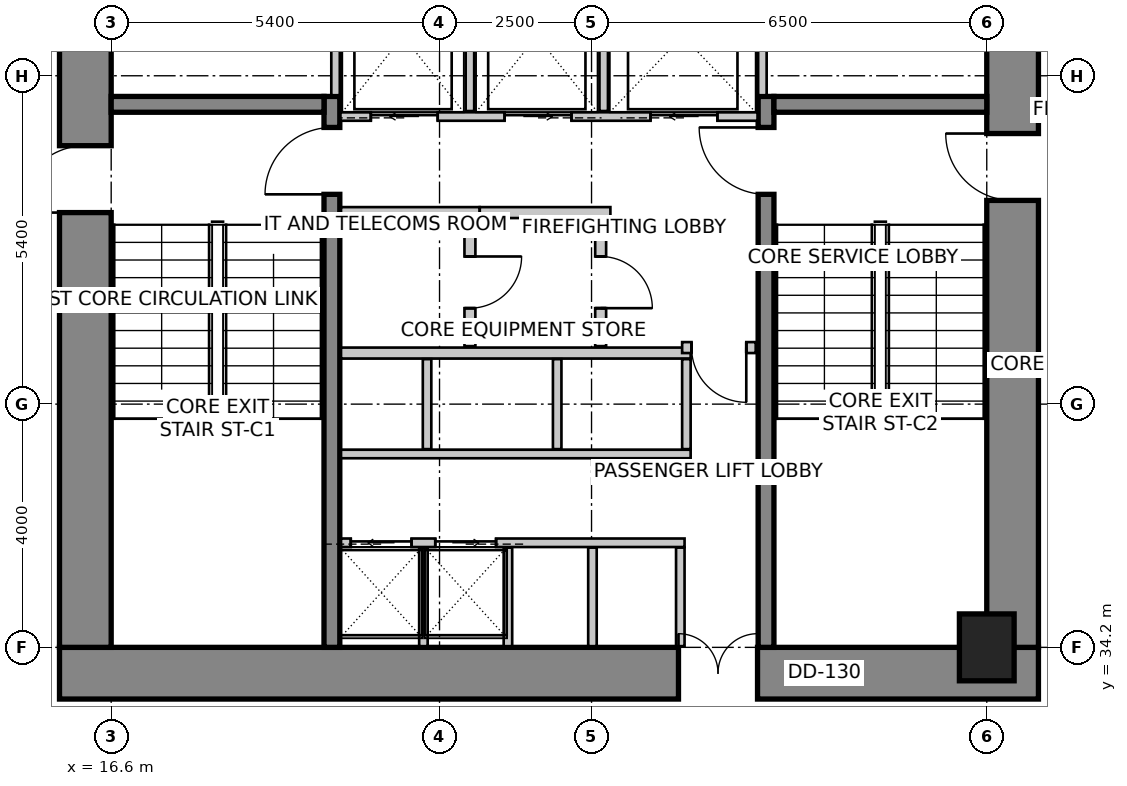
"""IFC4 building model, lengths in metres.
Left out: names, types, materials, properties, quantities, classifications, styles, units other than length and angle.
Written with IfcOpenShell. Run it as: python <this file> out.ifc"""

import sys

from ifc_helpers import new_model, si_unit, direction, frame, frame_2d, origin, origin_2d, place, context, subcontext, project, spatial, rectangle, extrude, source, transform, mapped, element, fill, save


model = new_model("IFC4")
c1 = context("Model", 3, precision=1e-05, world=origin(), true_north=direction((0.0, 1.0)))
c2 = subcontext(c1, "Body", "Model", "MODEL_VIEW")
j1 = project(units=[si_unit("LENGTHUNIT", "METRE"), si_unit("PLANEANGLEUNIT", "RADIAN")], contexts=[c1])
p1 = place(None, origin())
s1 = spatial("IfcSite", under=j1, at=p1, CompositionType="ELEMENT")
p2 = place(p1, origin())
s2 = spatial("IfcBuilding", under=s1, at=p2, CompositionType="ELEMENT")
p3 = place(p2, frame((0.0, 0.0, 35.0)))
s3 = spatial("IfcBuildingStorey", under=s2, at=p3, CompositionType="ELEMENT", Elevation=35.0)
p4 = place(p3, frame((15.75, 33.775, 0.0), z_axis=(0.0, 0.0, 1.0), x_axis=(1.0, 0.0, 0.0)))
e1 = element("IfcWall", 1, at=p4, inside=s3, PredefinedType="SHEAR", context=c2, shape_type="SweptSolid", body=[
    extrude(rectangle(XDim=16.1, YDim=0.85, at=frame_2d((8.05, 0.0))), origin(), (0.0, 0.0, 1.0), 4.0),
])
m1 = source(origin(), c2, "Body", "SweptSolid", [
    extrude(rectangle(XDim=1.3, YDim=2.15, at=frame_2d((0.65, 1.075))), frame((0.0, 0.435, 0.0), z_axis=(0.0, -1.0, 0.0), x_axis=(1.0, 0.0, 0.0)), (0.0, 0.0, 1.0), 0.87),
])
p5 = place(p4, frame((10.18, 0.0, 0.0)))
e2 = element("IfcOpeningElement", 2, at=p5, cuts=e1, PredefinedType="OPENING", context=c2, shape_type="MappedRepresentation", body=[
    mapped(m1, transform((0.0, 0.0, 0.0), scale=1.0)),
])
p6 = place(p3, frame((16.175, 34.2, 0.0), z_axis=(0.0, 0.0, 1.0), x_axis=(0.0, 1.0, 0.0)))
e3 = element("IfcWall", 3, at=p6, inside=s3, PredefinedType="SHEAR", context=c2, shape_type="SweptSolid", body=[
    extrude(rectangle(XDim=11.4, YDim=0.85, at=frame_2d((5.7, 0.0))), origin(), (0.0, 0.0, 1.0), 4.0),
])
m2 = source(origin(), c2, "Body", "SweptSolid", [
    extrude(rectangle(XDim=1.1, YDim=2.15, at=frame_2d((0.55, 1.075))), frame((0.0, 0.435, 0.0), z_axis=(0.0, -1.0, 0.0), x_axis=(1.0, 0.0, 0.0)), (0.0, 0.0, 1.0), 0.87),
])
p7 = place(p6, frame((7.15, 0.0, 0.0)))
e4 = element("IfcOpeningElement", 4, at=p7, cuts=e3, PredefinedType="OPENING", context=c2, shape_type="MappedRepresentation", body=[
    mapped(m2, transform((0.0, 0.0, 0.0), scale=1.0)),
])
p8 = place(p3, frame((31.425, 34.2, 0.0), z_axis=(0.0, 0.0, 1.0), x_axis=(0.0, 1.0, 0.0)))
e5 = element("IfcWall", 5, at=p8, inside=s3, PredefinedType="SHEAR", context=c2, shape_type="SweptSolid", body=[
    extrude(rectangle(XDim=11.4, YDim=0.85, at=frame_2d((5.7, 0.0))), origin(), (0.0, 0.0, 1.0), 4.0),
])
p9 = place(p8, frame((7.35, 0.0, 0.0)))
e6 = element("IfcOpeningElement", 6, at=p9, cuts=e5, PredefinedType="OPENING", context=c2, shape_type="MappedRepresentation", body=[
    mapped(m2, transform((0.0, 0.0, 0.0), scale=1.0)),
])
p10 = place(p3, frame((20.23, 34.2, 0.0), z_axis=(0.0, 0.0, 1.0), x_axis=(0.0, 1.0, 0.0)))
e7 = element("IfcWall", 7, at=p10, inside=s3, PredefinedType="SHEAR", context=c2, shape_type="SweptSolid", body=[
    extrude(rectangle(XDim=9.06, YDim=0.26, at=frame_2d((4.53, 0.0))), origin(), (0.0, 0.0, 1.0), 4.0),
])
m3 = source(origin(), c2, "Body", "SweptSolid", [
    extrude(rectangle(XDim=1.1, YDim=2.15, at=frame_2d((0.55, 1.075))), frame((0.0, 0.14, 0.0), z_axis=(0.0, -1.0, 0.0), x_axis=(1.0, 0.0, 0.0)), (0.0, 0.0, 1.0), 0.28),
])
p11 = place(p10, frame((7.45, 0.0, 0.0)))
e8 = element("IfcOpeningElement", 8, at=p11, cuts=e7, PredefinedType="OPENING", context=c2, shape_type="MappedRepresentation", body=[
    mapped(m3, transform((0.0, 0.0, 0.0), scale=1.0)),
])
p12 = place(p3, frame((27.37, 34.2, 0.0), z_axis=(0.0, 0.0, 1.0), x_axis=(0.0, 1.0, 0.0)))
e9 = element("IfcWall", 9, at=p12, inside=s3, PredefinedType="SHEAR", context=c2, shape_type="SweptSolid", body=[
    extrude(rectangle(XDim=9.06, YDim=0.26, at=frame_2d((4.53, 0.0))), origin(), (0.0, 0.0, 1.0), 4.0),
])
p13 = place(p12, frame((7.45, 0.0, 0.0)))
e10 = element("IfcOpeningElement", 10, at=p13, cuts=e9, PredefinedType="OPENING", context=c2, shape_type="MappedRepresentation", body=[
    mapped(m3, transform((0.0, 0.0, 0.0), scale=1.0)),
])
for number, where, z_axis, x_axis in (
    (11, (16.6, 43.13, 0.0), (0.0, 0.0, 1.0), (1.0, 0.0, 0.0)),
    (12, (27.5, 43.13, 0.0), (0.0, 0.0, 1.0), (1.0, 0.0, 0.0)),
):
    element("IfcWall", number, at=place(p3, frame(where, z_axis=z_axis, x_axis=x_axis)), inside=s3, PredefinedType="SHEAR", context=c2, shape_type="SweptSolid", body=[
        extrude(rectangle(XDim=3.5, YDim=0.26, at=frame_2d((1.75, 0.0))), origin(), (0.0, 0.0, 1.0), 4.0),
    ])
m4 = source(origin(), c2, "Body", "SweptSolid", [
    extrude(rectangle(XDim=0.9, YDim=1.1, at=origin_2d()), origin(), (0.0, 0.0, 1.0), 4.0),
])
p14 = place(p3, frame((31.0, 34.2, 0.0), z_axis=(0.0, 0.0, 1.0), x_axis=(1.0, 0.0, 0.0)))
e13 = element("IfcColumn", 13, at=p14, inside=s3, PredefinedType="COLUMN", context=c2, shape_type="MappedRepresentation", body=[
    mapped(m4, transform((0.0, 0.0, 0.0), scale=1.0)),
])
p15 = place(p3, frame((20.37, 42.93, 0.0), z_axis=(0.0, 0.0, 1.0), x_axis=(1.0, 0.0, 0.0)))
e14 = element("IfcWall", 14, at=p15, inside=s3, PredefinedType="SOLIDWALL", context=c2, shape_type="SweptSolid", body=[
    extrude(rectangle(XDim=6.86, YDim=0.14, at=frame_2d((3.43, 0.0))), origin(), (0.0, 0.0, 1.0), 3.75),
])
m5 = source(origin(), c2, "Body", "SweptSolid", [
    extrude(rectangle(XDim=1.1, YDim=2.15, at=frame_2d((0.55, 1.075))), frame((0.0, 0.08, 0.0), z_axis=(0.0, -1.0, 0.0), x_axis=(1.0, 0.0, 0.0)), (0.0, 0.0, 1.0), 0.16),
])
p16 = place(p15, frame((0.5, 0.0, 0.0)))
e15 = element("IfcOpeningElement", 15, at=p16, cuts=e14, PredefinedType="OPENING", context=c2, shape_type="MappedRepresentation", body=[
    mapped(m5, transform((0.0, 0.0, 0.0), scale=1.0)),
])
p17 = place(p15, frame((2.7, 0.0, 0.0)))
e16 = element("IfcOpeningElement", 16, at=p17, cuts=e14, PredefinedType="OPENING", context=c2, shape_type="MappedRepresentation", body=[
    mapped(m5, transform((0.0, 0.0, 0.0), scale=1.0)),
])
p18 = place(p15, frame((5.1, 0.0, 0.0)))
e17 = element("IfcOpeningElement", 17, at=p18, cuts=e14, PredefinedType="OPENING", context=c2, shape_type="MappedRepresentation", body=[
    mapped(m5, transform((0.0, 0.0, 0.0), scale=1.0)),
])
for number, where, z_axis, x_axis in (
    (18, (20.29, 43.28, 0.0), (0.0, 0.0, 1.0), (0.0, 1.0, 0.0)),
    (19, (27.31, 43.28, 0.0), (0.0, 0.0, 1.0), (0.0, 1.0, 0.0)),
):
    element("IfcWall", number, at=place(p3, frame(where, z_axis=z_axis, x_axis=x_axis)), inside=s3, PredefinedType="SOLIDWALL", context=c2, shape_type="SweptSolid", body=[
        extrude(rectangle(XDim=2.3, YDim=0.14, at=frame_2d((1.15, 0.0))), origin(), (0.0, 0.0, 1.0), 3.75),
    ])
for number, where, z_axis, x_axis in (
    (20, (22.5, 43.02, 0.0), (0.0, 0.0, 1.0), (0.0, 1.0, 0.0)),
    (21, (24.7, 43.02, 0.0), (0.0, 0.0, 1.0), (0.0, 1.0, 0.0)),
):
    element("IfcWall", number, at=place(p3, frame(where, z_axis=z_axis, x_axis=x_axis)), inside=s3, PredefinedType="SOLIDWALL", context=c2, shape_type="SweptSolid", body=[
        extrude(rectangle(XDim=2.56, YDim=0.14, at=frame_2d((1.28, 0.0))), origin(), (0.0, 0.0, 1.0), 3.75),
    ])
p19 = place(p3, frame((20.38, 35.92, 0.0), z_axis=(0.0, 0.0, 1.0), x_axis=(1.0, 0.0, 0.0)))
e22 = element("IfcWall", 22, at=p19, inside=s3, PredefinedType="SOLIDWALL", context=c2, shape_type="SweptSolid", body=[
    extrude(rectangle(XDim=5.65, YDim=0.14, at=frame_2d((2.825, 0.0))), origin(), (0.0, 0.0, 1.0), 3.75),
])
m6 = source(origin(), c2, "Body", "SweptSolid", [
    extrude(rectangle(XDim=1.0, YDim=2.15, at=frame_2d((0.5, 1.075))), frame((0.0, 0.08, 0.0), z_axis=(0.0, -1.0, 0.0), x_axis=(1.0, 0.0, 0.0)), (0.0, 0.0, 1.0), 0.16),
])
p20 = place(p19, frame((0.16, 0.0, 0.0)))
e23 = element("IfcOpeningElement", 23, at=p20, cuts=e22, PredefinedType="OPENING", context=c2, shape_type="MappedRepresentation", body=[
    mapped(m6, transform((0.0, 0.0, 0.0), scale=1.0)),
])
p21 = place(p19, frame((1.55, 0.0, 0.0)))
e24 = element("IfcOpeningElement", 24, at=p21, cuts=e22, PredefinedType="OPENING", context=c2, shape_type="MappedRepresentation", body=[
    mapped(m6, transform((0.0, 0.0, 0.0), scale=1.0)),
])
for number, where, z_axis, x_axis in (
    (25, (25.96, 34.22, 0.0), (0.0, 0.0, 1.0), (0.0, 1.0, 0.0)),
    (26, (21.735, 34.22, 0.0), (0.0, 0.0, 1.0), (0.0, 1.0, 0.0)),
    (27, (23.125, 34.22, 0.0), (0.0, 0.0, 1.0), (0.0, 1.0, 0.0)),
    (28, (24.515, 34.22, 0.0), (0.0, 0.0, 1.0), (0.0, 1.0, 0.0)),
):
    element("IfcWall", number, at=place(p3, frame(where, z_axis=z_axis, x_axis=x_axis)), inside=s3, PredefinedType="SOLIDWALL", context=c2, shape_type="SweptSolid", body=[
        extrude(rectangle(XDim=1.62, YDim=0.14, at=frame_2d((0.81, 0.0))), origin(), (0.0, 0.0, 1.0), 3.042),
    ])
p22 = place(p3, frame((20.38, 37.38, 0.0), z_axis=(0.0, 0.0, 1.0), x_axis=(1.0, 0.0, 0.0)))
e29 = element("IfcWall", 29, at=p22, inside=s3, PredefinedType="SOLIDWALL", context=c2, shape_type="SweptSolid", body=[
    extrude(rectangle(XDim=5.75, YDim=0.14, at=frame_2d((2.875, 0.0))), origin(), (0.0, 0.0, 1.0), 3.75),
])
p23 = place(p3, frame((20.38, 39.04, 0.0), z_axis=(0.0, 0.0, 1.0), x_axis=(1.0, 0.0, 0.0)))
e30 = element("IfcWall", 30, at=p23, inside=s3, PredefinedType="SOLIDWALL", context=c2, shape_type="SweptSolid", body=[
    extrude(rectangle(XDim=5.75, YDim=0.18, at=frame_2d((2.875, 0.0))), origin(), (0.0, 0.0, 1.0), 3.75),
])
for number, where, z_axis, x_axis in (
    (31, (26.06, 37.46, 0.0), (0.0, 0.0, 1.0), (0.0, 1.0, 0.0)),
    (32, (21.795, 37.46, 0.0), (0.0, 0.0, 1.0), (0.0, 1.0, 0.0)),
    (33, (23.935, 37.46, 0.0), (0.0, 0.0, 1.0), (0.0, 1.0, 0.0)),
):
    element("IfcWall", number, at=place(p3, frame(where, z_axis=z_axis, x_axis=x_axis)), inside=s3, PredefinedType="SOLIDWALL", context=c2, shape_type="SweptSolid", body=[
        extrude(rectangle(XDim=1.48, YDim=0.14, at=frame_2d((0.74, 0.0))), origin(), (0.0, 0.0, 1.0), 3.75),
    ])
p24 = place(p3, frame((22.66, 41.35, 0.0), z_axis=(0.0, 0.0, 1.0), x_axis=(-1.0, 0.0, 0.0)))
e34 = element("IfcWall", 34, at=p24, inside=s3, PredefinedType="PARTITIONING", context=c2, shape_type="SweptSolid", body=[
    extrude(rectangle(XDim=2.28, YDim=0.18, at=frame_2d((1.14, 0.0))), origin(), (0.0, 0.0, 1.0), 3.75),
])
p25 = place(p3, frame((24.81, 41.35, 0.0), z_axis=(0.0, 0.0, 1.0), x_axis=(-1.0, 0.0, 0.0)))
e35 = element("IfcWall", 35, at=p25, inside=s3, PredefinedType="PARTITIONING", context=c2, shape_type="SweptSolid", body=[
    extrude(rectangle(XDim=2.148, YDim=0.18, at=frame_2d((1.074, 0.0))), origin(), (0.0, 0.0, 1.0), 3.75),
])
p26 = place(p3, frame((22.5, 41.256, 0.0), z_axis=(0.0, 0.0, 1.0), x_axis=(0.0, -1.0, 0.0)))
e36 = element("IfcWall", 36, at=p26, inside=s3, PredefinedType="PARTITIONING", context=c2, shape_type="SweptSolid", body=[
    extrude(rectangle(XDim=2.106, YDim=0.18, at=frame_2d((1.053, 0.0))), origin(), (0.0, 0.0, 1.0), 3.75),
])
m7 = source(origin(), c2, "Body", "SweptSolid", [
    extrude(rectangle(XDim=0.85, YDim=2.15, at=frame_2d((0.425, 1.075))), frame((0.0, 0.1, 0.0), z_axis=(0.0, -1.0, 0.0), x_axis=(1.0, 0.0, 0.0)), (0.0, 0.0, 1.0), 0.2),
])
p27 = place(p26, frame((0.628, 0.0, 0.0)))
e37 = element("IfcOpeningElement", 37, at=p27, cuts=e36, PredefinedType="OPENING", context=c2, shape_type="MappedRepresentation", body=[
    mapped(m7, transform((0.0, 0.0, 0.0), scale=1.0)),
])
p28 = place(p3, frame((24.65, 41.256, 0.0), z_axis=(0.0, 0.0, 1.0), x_axis=(0.0, -1.0, 0.0)))
e38 = element("IfcWall", 38, at=p28, inside=s3, PredefinedType="PARTITIONING", context=c2, shape_type="SweptSolid", body=[
    extrude(rectangle(XDim=2.106, YDim=0.18, at=frame_2d((1.053, 0.0))), origin(), (0.0, 0.0, 1.0), 3.75),
])
p29 = place(p28, frame((0.628, 0.0, 0.0)))
e39 = element("IfcOpeningElement", 39, at=p29, cuts=e38, PredefinedType="OPENING", context=c2, shape_type="MappedRepresentation", body=[
    mapped(m7, transform((0.0, 0.0, 0.0), scale=1.0)),
])
p30 = place(p3, frame((27.2, 39.13, 0.0), z_axis=(0.0, 0.0, 1.0), x_axis=(-1.0, 0.0, 0.0)))
e40 = element("IfcWall", 40, at=p30, inside=s3, PredefinedType="PARTITIONING", context=c2, shape_type="SweptSolid", body=[
    extrude(rectangle(XDim=1.21, YDim=0.18, at=frame_2d((0.605, 0.0))), origin(), (0.0, 0.0, 1.0), 3.75),
])
m8 = source(origin(), c2, "Body", "SweptSolid", [
    extrude(rectangle(XDim=0.9, YDim=2.15, at=frame_2d((0.45, 1.075))), frame((0.0, 0.1, 0.0), z_axis=(0.0, -1.0, 0.0), x_axis=(1.0, 0.0, 0.0)), (0.0, 0.0, 1.0), 0.2),
])
p31 = place(p30, frame((0.155, 0.0, 0.0)))
e41 = element("IfcOpeningElement", 41, at=p31, cuts=e40, PredefinedType="OPENING", context=c2, shape_type="MappedRepresentation", body=[
    mapped(m8, transform((0.0, 0.0, 0.0), scale=1.0)),
])
m9 = source(origin(), c2, "Body", "SweptSolid", [
    extrude(rectangle(XDim=1.1, YDim=2.15, at=frame_2d((0.55, 1.075))), frame((0.0, 0.025, 0.0), z_axis=(0.0, -1.0, 0.0), x_axis=(1.0, 0.0, 0.0)), (0.0, 0.0, 1.0), 0.05),
])
p32 = place(p16, origin())
e42 = element("IfcDoor", 42, at=p32, inside=s3, OperationType="SLIDING_TO_LEFT", PredefinedType="DOOR", context=c2, shape_type="MappedRepresentation", body=[
    mapped(m9, transform((0.0, 0.0, 0.0), scale=1.0)),
])
fill(e15, e42)
p33 = place(p17, origin())
e43 = element("IfcDoor", 43, at=p33, inside=s3, OperationType="SLIDING_TO_RIGHT", PredefinedType="DOOR", context=c2, shape_type="MappedRepresentation", body=[
    mapped(m9, transform((0.0, 0.0, 0.0), scale=1.0)),
])
fill(e16, e43)
m10 = source(origin(), c2, "Body", "SweptSolid", [
    extrude(rectangle(XDim=1.1, YDim=2.15, at=frame_2d((0.55, 1.075))), frame((0.0, 0.025, 0.0), z_axis=(0.0, -1.0, 0.0), x_axis=(1.0, 0.0, 0.0)), (0.0, 0.0, 1.0), 0.05),
])
p34 = place(p18, origin())
e44 = element("IfcDoor", 44, at=p34, inside=s3, OperationType="SLIDING_TO_LEFT", PredefinedType="DOOR", context=c2, shape_type="MappedRepresentation", body=[
    mapped(m10, transform((0.0, 0.0, 0.0), scale=1.0)),
])
fill(e17, e44)
m11 = source(origin(), c2, "Body", "SweptSolid", [
    extrude(rectangle(XDim=1.0, YDim=2.15, at=frame_2d((0.5, 1.075))), frame((0.0, 0.025, 0.0), z_axis=(0.0, -1.0, 0.0), x_axis=(1.0, 0.0, 0.0)), (0.0, 0.0, 1.0), 0.05),
])
p35 = place(p20, origin())
e45 = element("IfcDoor", 45, at=p35, inside=s3, OperationType="SLIDING_TO_LEFT", PredefinedType="DOOR", context=c2, shape_type="MappedRepresentation", body=[
    mapped(m11, transform((0.0, 0.0, 0.0), scale=1.0)),
])
fill(e23, e45)
p36 = place(p21, origin())
e46 = element("IfcDoor", 46, at=p36, inside=s3, OperationType="SLIDING_TO_RIGHT", PredefinedType="DOOR", context=c2, shape_type="MappedRepresentation", body=[
    mapped(m11, transform((0.0, 0.0, 0.0), scale=1.0)),
])
fill(e24, e46)
m12 = source(origin(), c2, "Body", "SweptSolid", [
    extrude(rectangle(XDim=1.1, YDim=2.15, at=frame_2d((0.55, 1.075))), frame((0.0, 0.025, 0.0), z_axis=(0.0, -1.0, 0.0), x_axis=(1.0, 0.0, 0.0)), (0.0, 0.0, 1.0), 0.05),
])
p37 = place(p11, origin())
e47 = element("IfcDoor", 47, at=p37, inside=s3, OperationType="SINGLE_SWING_LEFT", PredefinedType="DOOR", context=c2, shape_type="MappedRepresentation", body=[
    mapped(m12, transform((0.0, 0.0, 0.0), scale=1.0)),
])
fill(e8, e47)
p38 = place(p13, origin())
e48 = element("IfcDoor", 48, at=p38, inside=s3, OperationType="SINGLE_SWING_RIGHT", PredefinedType="DOOR", context=c2, shape_type="MappedRepresentation", body=[
    mapped(m12, transform((0.0, 0.0, 0.0), scale=1.0)),
])
fill(e10, e48)
p39 = place(p7, origin())
e49 = element("IfcDoor", 49, at=p39, inside=s3, OperationType="SINGLE_SWING_LEFT", PredefinedType="DOOR", context=c2, shape_type="MappedRepresentation", body=[
    mapped(m12, transform((0.0, 0.0, 0.0), scale=1.0)),
])
fill(e4, e49)
p40 = place(p9, origin())
e50 = element("IfcDoor", 50, at=p40, inside=s3, OperationType="SINGLE_SWING_RIGHT", PredefinedType="DOOR", context=c2, shape_type="MappedRepresentation", body=[
    mapped(m12, transform((0.0, 0.0, 0.0), scale=1.0)),
])
fill(e6, e50)
m13 = source(origin(), c2, "Body", "SweptSolid", [
    extrude(rectangle(XDim=1.3, YDim=2.15, at=frame_2d((0.65, 1.075))), frame((0.0, 0.025, 0.0), z_axis=(0.0, -1.0, 0.0), x_axis=(1.0, 0.0, 0.0)), (0.0, 0.0, 1.0), 0.05),
])
p41 = place(p5, origin())
e51 = element("IfcDoor", 51, at=p41, inside=s3, OperationType="DOUBLE_DOOR_SINGLE_SWING", PredefinedType="DOOR", context=c2, shape_type="MappedRepresentation", body=[
    mapped(m13, transform((0.0, 0.0, 0.0), scale=1.0)),
])
fill(e2, e51)
m14 = source(origin(), c2, "Body", "SweptSolid", [
    extrude(rectangle(XDim=0.85, YDim=2.15, at=frame_2d((0.425, 1.075))), frame((0.0, 0.025, 0.0), z_axis=(0.0, -1.0, 0.0), x_axis=(1.0, 0.0, 0.0)), (0.0, 0.0, 1.0), 0.05),
])
p42 = place(p27, origin())
e52 = element("IfcDoor", 52, at=p42, inside=s3, OperationType="SINGLE_SWING_LEFT", PredefinedType="DOOR", context=c2, shape_type="MappedRepresentation", body=[
    mapped(m14, transform((0.0, 0.0, 0.0), scale=1.0)),
])
fill(e37, e52)
p43 = place(p29, origin())
e53 = element("IfcDoor", 53, at=p43, inside=s3, OperationType="SINGLE_SWING_RIGHT", PredefinedType="DOOR", context=c2, shape_type="MappedRepresentation", body=[
    mapped(m14, transform((0.0, 0.0, 0.0), scale=1.0)),
])
fill(e39, e53)
m15 = source(origin(), c2, "Body", "SweptSolid", [
    extrude(rectangle(XDim=0.9, YDim=2.15, at=frame_2d((0.45, 1.075))), frame((0.0, 0.025, 0.0), z_axis=(0.0, -1.0, 0.0), x_axis=(1.0, 0.0, 0.0)), (0.0, 0.0, 1.0), 0.05),
])
p44 = place(p31, origin())
e54 = element("IfcDoor", 54, at=p44, inside=s3, OperationType="SINGLE_SWING_LEFT", PredefinedType="DOOR", context=c2, shape_type="MappedRepresentation", body=[
    mapped(m15, transform((0.0, 0.0, 0.0), scale=1.0)),
])
fill(e41, e54)
save(model, sys.argv[1])
